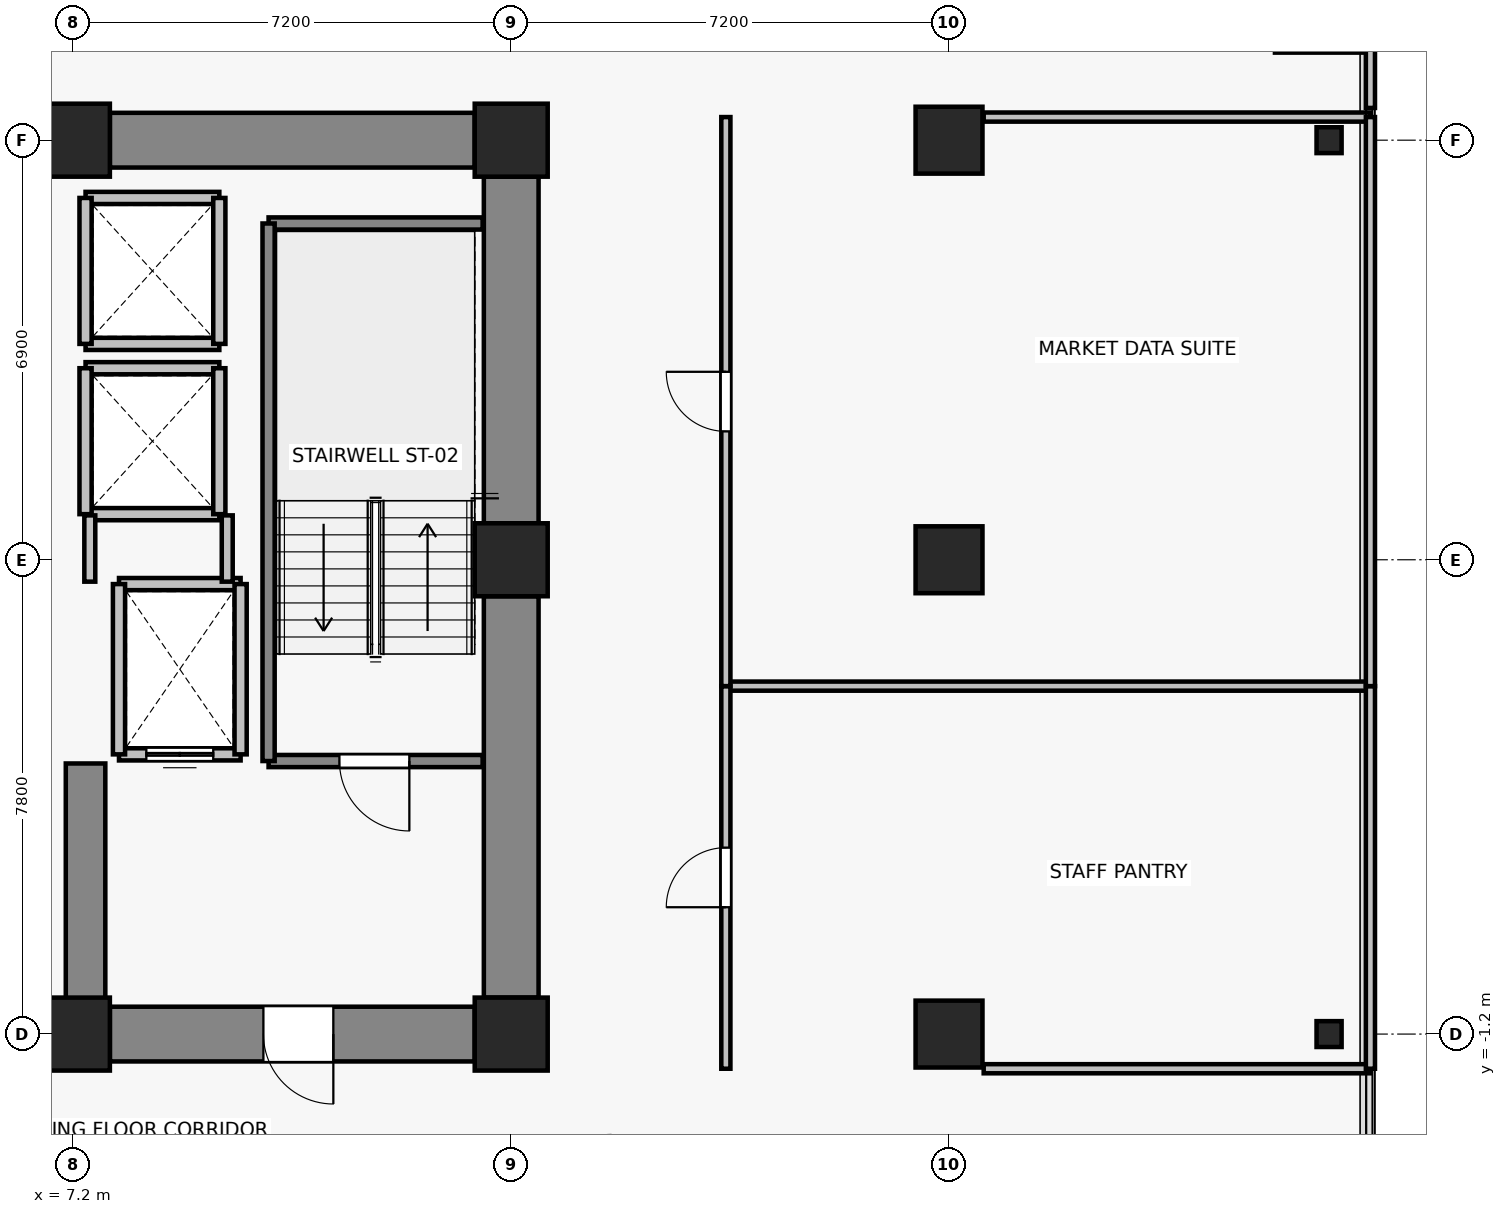
"""IFC4 building model, lengths in metres.
Left out: names, types, materials, properties, quantities, classifications, styles, units other than length and angle.
Written with IfcOpenShell. Run it as: python <this file> out.ifc"""

import sys

from ifc_helpers import new_model, si_unit, direction, frame, frame_2d, origin, origin_2d, place, context, subcontext, project, spatial, rectangle, i_section, extrude, source, transform, mapped, element, fill, save


model = new_model("IFC4")
c1 = context("Model", 3, precision=1e-05, world=origin(), true_north=direction((0.0, 1.0)))
c2 = subcontext(c1, "Body", "Model", "MODEL_VIEW")
j1 = project(units=[si_unit("LENGTHUNIT", "METRE"), si_unit("PLANEANGLEUNIT", "RADIAN")], contexts=[c1])
p1 = place(None, origin())
s1 = spatial("IfcSite", under=j1, at=p1, CompositionType="ELEMENT")
p2 = place(p1, origin())
s2 = spatial("IfcBuilding", under=s1, at=p2, CompositionType="ELEMENT")
p3 = place(p2, frame((0.0, 0.0, 27.4)))
s3 = spatial("IfcBuildingStorey", under=s2, at=p3, CompositionType="ELEMENT", Elevation=27.4)
for number, where, z_axis, x_axis in (
    (1, (7.2, -1.2, 0.0), (0.0, 0.0, 1.0), (1.0, 0.0, 0.0)),
    (2, (14.4, -1.2, 0.0), (0.0, 0.0, 1.0), (1.0, 0.0, 0.0)),
    (3, (14.4, 6.6, 0.0), (0.0, 0.0, 1.0), (1.0, 0.0, 0.0)),
    (4, (7.2, 13.5, 0.0), (0.0, 0.0, 1.0), (1.0, 0.0, 0.0)),
    (5, (14.4, 13.5, 0.0), (0.0, 0.0, 1.0), (1.0, 0.0, 0.0)),
):
    element("IfcColumn", number, at=place(p3, frame(where, z_axis=z_axis, x_axis=x_axis)), inside=s3, PredefinedType="COLUMN", context=c2, shape_type="SweptSolid", body=[
        extrude(rectangle(XDim=1.2, YDim=1.2, at=origin_2d()), origin(), (0.0, 0.0, 1.0), 3.3),
    ])
for number, where, z_axis, x_axis in (
    (6, (21.6, -1.2, 0.0), (0.0, 0.0, 1.0), (1.0, 0.0, 0.0)),
    (7, (21.6, 6.6, 0.0), (0.0, 0.0, 1.0), (1.0, 0.0, 0.0)),
    (8, (21.6, 13.5, 0.0), (0.0, 0.0, 1.0), (1.0, 0.0, 0.0)),
):
    element("IfcColumn", number, at=place(p3, frame(where, z_axis=z_axis, x_axis=x_axis)), inside=s3, PredefinedType="COLUMN", context=c2, shape_type="SweptSolid", body=[
        extrude(rectangle(XDim=1.1, YDim=1.1, at=origin_2d()), origin(), (0.0, 0.0, 1.0), 3.3),
    ])
for number, where, z_axis, x_axis in (
    (9, (27.85, -1.2, 0.0), (0.0, 0.0, 1.0), (1.0, 0.0, 0.0)),
    (10, (27.85, 13.5, 0.0), (0.0, 0.0, 1.0), (1.0, 0.0, 0.0)),
):
    element("IfcColumn", number, at=place(p3, frame(where, z_axis=z_axis, x_axis=x_axis)), inside=s3, PredefinedType="COLUMN", context=c2, shape_type="SweptSolid", body=[
        extrude(i_section(OverallWidth=0.412, OverallDepth=0.425, WebThickness=0.026, FlangeThickness=0.039, FilletRadius=0.015, at=origin_2d()), origin(), (0.0, 0.0, 1.0), 3.3),
    ])
p4 = place(p3, frame((7.8, 13.5, 0.0), z_axis=(0.0, 0.0, 1.0), x_axis=(1.0, 0.0, 0.0)))
e11 = element("IfcWall", 11, at=p4, inside=s3, PredefinedType="SHEAR", context=c2, shape_type="SweptSolid", body=[
    extrude(rectangle(XDim=6.0, YDim=0.9, at=frame_2d((3.0, 0.0))), origin(), (0.0, 0.0, 1.0), 3.075),
])
p5 = place(p3, frame((14.4, -0.6, 0.0), z_axis=(0.0, 0.0, 1.0), x_axis=(0.0, 1.0, 0.0)))
e12 = element("IfcWall", 12, at=p5, inside=s3, PredefinedType="SHEAR", context=c2, shape_type="SweptSolid", body=[
    extrude(rectangle(XDim=6.6, YDim=0.9, at=frame_2d((3.3, 0.0))), origin(), (0.0, 0.0, 1.0), 3.075),
])
p6 = place(p3, frame((14.4, 7.2, 0.0), z_axis=(0.0, 0.0, 1.0), x_axis=(0.0, 1.0, 0.0)))
e13 = element("IfcWall", 13, at=p6, inside=s3, PredefinedType="SHEAR", context=c2, shape_type="SweptSolid", body=[
    extrude(rectangle(XDim=5.7, YDim=0.9, at=frame_2d((2.85, 0.0))), origin(), (0.0, 0.0, 1.0), 3.075),
])
p7 = place(p3, frame((13.8, -1.2, 0.0), z_axis=(0.0, 0.0, 1.0), x_axis=(-1.0, 0.0, 0.0)))
e14 = element("IfcWall", 14, at=p7, inside=s3, PredefinedType="SHEAR", context=c2, shape_type="SweptSolid", body=[
    extrude(rectangle(XDim=6.0, YDim=0.9, at=frame_2d((3.0, 0.0))), origin(), (0.0, 0.0, 1.0), 3.075),
])
p8 = place(p7, frame((2.325, 0.0, 0.0)))
e15 = element("IfcOpeningElement", 15, at=p8, cuts=e14, PredefinedType="OPENING", context=c2, shape_type="SweptSolid", body=[
    extrude(rectangle(XDim=1.15, YDim=2.15, at=frame_2d((0.575, 1.075))), frame((0.0, 0.46, 0.0), z_axis=(0.0, -1.0, 0.0), x_axis=(1.0, 0.0, 0.0)), (0.0, 0.0, 1.0), 0.92),
])
p9 = place(p3, frame((7.4, -0.75, 0.0), z_axis=(0.0, 0.0, 1.0), x_axis=(0.0, 1.0, 0.0)))
e16 = element("IfcWall", 16, at=p9, inside=s3, PredefinedType="SHEAR", context=c2, shape_type="SweptSolid", body=[
    extrude(rectangle(XDim=4.0, YDim=0.65, at=frame_2d((2.0, 0.0))), origin(), (0.0, 0.0, 1.0), 3.075),
])
p10 = place(p3, frame((28.46, 15.06, 0.0), z_axis=(0.0, 0.0, 1.0), x_axis=(-1.0, 0.0, 0.0)))
e17 = element("IfcWall", 17, at=p10, inside=s3, PredefinedType="SOLIDWALL", context=c2, shape_type="SweptSolid", body=[
    extrude(rectangle(XDim=1.5, YDim=0.24, at=frame_2d((0.75, 0.0))), origin(), (0.0, 0.0, 1.0), 3.075),
])
p11 = place(p3, frame((9.95, 3.4, 0.0), z_axis=(0.0, 0.0, 1.0), x_axis=(-1.0, 0.0, 0.0)))
e18 = element("IfcWall", 18, at=p11, inside=s3, PredefinedType="SOLIDWALL", context=c2, shape_type="SweptSolid", body=[
    extrude(rectangle(XDim=2.0, YDim=0.2, at=frame_2d((1.0, 0.0))), origin(), (0.0, 0.0, 1.0), 3.075),
])
p12 = place(p11, frame((0.45, 0.0, 0.0)))
e19 = element("IfcOpeningElement", 19, at=p12, cuts=e18, PredefinedType="OPENING", context=c2, shape_type="SweptSolid", body=[
    extrude(rectangle(XDim=1.1, YDim=2.2, at=frame_2d((0.55, 1.1))), frame((0.0, 0.11, 0.0), z_axis=(0.0, -1.0, 0.0), x_axis=(1.0, 0.0, 0.0)), (0.0, 0.0, 1.0), 0.22),
])
p13 = place(p3, frame((7.95, 6.2, 0.0), z_axis=(0.0, 0.0, 1.0), x_axis=(1.0, 0.0, 0.0)))
e20 = element("IfcWall", 20, at=p13, inside=s3, PredefinedType="SOLIDWALL", context=c2, shape_type="SweptSolid", body=[
    extrude(rectangle(XDim=2.0, YDim=0.2, at=frame_2d((1.0, 0.0))), origin(), (0.0, 0.0, 1.0), 3.075),
])
for number, where, z_axis, x_axis in (
    (21, (7.95, 3.4, 0.0), (0.0, 0.0, 1.0), (0.0, 1.0, 0.0)),
    (22, (9.95, 6.2, 0.0), (0.0, 0.0, 1.0), (0.0, -1.0, 0.0)),
):
    element("IfcWall", number, at=place(p3, frame(where, z_axis=z_axis, x_axis=x_axis)), inside=s3, PredefinedType="SOLIDWALL", context=c2, shape_type="SweptSolid", body=[
        extrude(rectangle(XDim=2.8, YDim=0.2, at=frame_2d((1.4, 0.0))), origin(), (0.0, 0.0, 1.0), 3.075),
    ])
for number, where, z_axis, x_axis in (
    (23, (9.6, 7.35, 0.0), (0.0, 0.0, 1.0), (-1.0, 0.0, 0.0)),
    (24, (7.4, 9.75, 0.0), (0.0, 0.0, 1.0), (1.0, 0.0, 0.0)),
):
    element("IfcWall", number, at=place(p3, frame(where, z_axis=z_axis, x_axis=x_axis)), inside=s3, PredefinedType="SOLIDWALL", context=c2, shape_type="SweptSolid", body=[
        extrude(rectangle(XDim=2.2, YDim=0.2, at=frame_2d((1.1, 0.0))), origin(), (0.0, 0.0, 1.0), 2.465),
    ])
p14 = place(p3, frame((7.4, 7.35, 0.0), z_axis=(0.0, 0.0, 1.0), x_axis=(0.0, 1.0, 0.0)))
e25 = element("IfcWall", 25, at=p14, inside=s3, PredefinedType="SOLIDWALL", context=c2, shape_type="SweptSolid", body=[
    extrude(rectangle(XDim=2.4, YDim=0.2, at=frame_2d((1.2, 0.0))), origin(), (0.0, 0.0, 1.0), 2.465),
])
p15 = place(p3, frame((9.6, 9.75, 0.0), z_axis=(0.0, 0.0, 1.0), x_axis=(0.0, -1.0, 0.0)))
e26 = element("IfcWall", 26, at=p15, inside=s3, PredefinedType="SOLIDWALL", context=c2, shape_type="SweptSolid", body=[
    extrude(rectangle(XDim=2.4, YDim=0.2, at=frame_2d((1.2, 0.0))), origin(), (0.0, 0.0, 1.0), 3.075),
])
for number, where, z_axis, x_axis in (
    (27, (9.6, 10.15, 0.0), (0.0, 0.0, 1.0), (-1.0, 0.0, 0.0)),
    (28, (7.4, 12.55, 0.0), (0.0, 0.0, 1.0), (1.0, 0.0, 0.0)),
):
    element("IfcWall", number, at=place(p3, frame(where, z_axis=z_axis, x_axis=x_axis)), inside=s3, PredefinedType="SOLIDWALL", context=c2, shape_type="SweptSolid", body=[
        extrude(rectangle(XDim=2.2, YDim=0.2, at=frame_2d((1.1, 0.0))), origin(), (0.0, 0.0, 1.0), 2.465),
    ])
p16 = place(p3, frame((7.4, 10.15, 0.0), z_axis=(0.0, 0.0, 1.0), x_axis=(0.0, 1.0, 0.0)))
e29 = element("IfcWall", 29, at=p16, inside=s3, PredefinedType="SOLIDWALL", context=c2, shape_type="SweptSolid", body=[
    extrude(rectangle(XDim=2.4, YDim=0.2, at=frame_2d((1.2, 0.0))), origin(), (0.0, 0.0, 1.0), 2.465),
])
p17 = place(p3, frame((9.6, 12.55, 0.0), z_axis=(0.0, 0.0, 1.0), x_axis=(0.0, -1.0, 0.0)))
e30 = element("IfcWall", 30, at=p17, inside=s3, PredefinedType="SOLIDWALL", context=c2, shape_type="SweptSolid", body=[
    extrude(rectangle(XDim=2.4, YDim=0.2, at=frame_2d((1.2, 0.0))), origin(), (0.0, 0.0, 1.0), 3.075),
])
p18 = place(p3, frame((13.93, 3.29, 0.0), z_axis=(0.0, 0.0, 1.0), x_axis=(-1.0, 0.0, 0.0)))
e31 = element("IfcWall", 31, at=p18, inside=s3, PredefinedType="SOLIDWALL", context=c2, shape_type="SweptSolid", body=[
    extrude(rectangle(XDim=3.52, YDim=0.2, at=frame_2d((1.76, 0.0))), origin(), (0.0, 0.0, 1.0), 3.075),
])
p19 = place(p18, frame((1.205, 0.0, 0.0)))
e32 = element("IfcOpeningElement", 32, at=p19, cuts=e31, PredefinedType="OPENING", context=c2, shape_type="SweptSolid", body=[
    extrude(rectangle(XDim=1.15, YDim=2.15, at=frame_2d((0.575, 1.075))), frame((0.0, 0.11, 0.0), z_axis=(0.0, -1.0, 0.0), x_axis=(1.0, 0.0, 0.0)), (0.0, 0.0, 1.0), 0.22),
])
p20 = place(p3, frame((10.41, 12.13, 0.0), z_axis=(0.0, 0.0, 1.0), x_axis=(1.0, 0.0, 0.0)))
e33 = element("IfcWall", 33, at=p20, inside=s3, PredefinedType="SOLIDWALL", context=c2, shape_type="SweptSolid", body=[
    extrude(rectangle(XDim=3.52, YDim=0.2, at=frame_2d((1.76, 0.0))), origin(), (0.0, 0.0, 1.0), 3.075),
])
p21 = place(p3, frame((10.41, 3.29, 0.0), z_axis=(0.0, 0.0, 1.0), x_axis=(0.0, 1.0, 0.0)))
e34 = element("IfcWall", 34, at=p21, inside=s3, PredefinedType="SOLIDWALL", context=c2, shape_type="SweptSolid", body=[
    extrude(rectangle(XDim=8.84, YDim=0.2, at=frame_2d((4.42, 0.0))), origin(), (0.0, 0.0, 1.0), 3.075),
])
p22 = place(p3, frame((7.47, 6.24, 0.0), z_axis=(0.0, 0.0, 1.0), x_axis=(0.0, 1.0, 0.0)))
e35 = element("IfcWall", 35, at=p22, inside=s3, PredefinedType="PARTITIONING", context=c2, shape_type="SweptSolid", body=[
    extrude(rectangle(XDim=1.09, YDim=0.18, at=frame_2d((0.545, 0.0))), origin(), (0.0, 0.0, 1.0), 2.465),
])
p23 = place(p3, frame((9.73, 7.33, 0.0), z_axis=(0.0, 0.0, 1.0), x_axis=(0.0, -1.0, 0.0)))
e36 = element("IfcWall", 36, at=p23, inside=s3, PredefinedType="PARTITIONING", context=c2, shape_type="SweptSolid", body=[
    extrude(rectangle(XDim=1.09, YDim=0.18, at=frame_2d((0.545, 0.0))), origin(), (0.0, 0.0, 1.0), 3.075),
])
p24 = place(p3, frame((28.53, -1.77, 0.0), z_axis=(0.0, 0.0, 1.0), x_axis=(-1.0, 0.0, 0.0)))
e37 = element("IfcWall", 37, at=p24, inside=s3, PredefinedType="PARTITIONING", context=c2, shape_type="SweptSolid", body=[
    extrude(rectangle(XDim=6.36, YDim=0.15, at=frame_2d((3.18, 0.0))), origin(), (0.0, 0.0, 1.0), 2.465),
])
p25 = place(p3, frame((17.93, 4.522, 0.0), z_axis=(0.0, 0.0, 1.0), x_axis=(1.0, 0.0, 0.0)))
e38 = element("IfcWall", 38, at=p25, inside=s3, PredefinedType="PARTITIONING", context=c2, shape_type="SweptSolid", body=[
    extrude(rectangle(XDim=10.6, YDim=0.15, at=frame_2d((5.3, 0.0))), origin(), (0.0, 0.0, 1.0), 2.465),
])
p26 = place(p3, frame((17.93, -1.77, 0.0), z_axis=(0.0, 0.0, 1.0), x_axis=(0.0, 1.0, 0.0)))
e39 = element("IfcWall", 39, at=p26, inside=s3, PredefinedType="PARTITIONING", context=c2, shape_type="SweptSolid", body=[
    extrude(rectangle(XDim=6.292, YDim=0.15, at=frame_2d((3.146, 0.0))), origin(), (0.0, 0.0, 1.0), 2.465),
])
p27 = place(p26, frame((2.656, 0.0, 0.0)))
e40 = element("IfcOpeningElement", 40, at=p27, cuts=e39, PredefinedType="OPENING", context=c2, shape_type="SweptSolid", body=[
    extrude(rectangle(XDim=0.98, YDim=2.15, at=frame_2d((0.49, 1.075))), frame((0.0, 0.085, 0.0), z_axis=(0.0, -1.0, 0.0), x_axis=(1.0, 0.0, 0.0)), (0.0, 0.0, 1.0), 0.17),
])
p28 = place(p3, frame((28.53, 4.522, 0.0), z_axis=(0.0, 0.0, 1.0), x_axis=(0.0, -1.0, 0.0)))
e41 = element("IfcWall", 41, at=p28, inside=s3, PredefinedType="PARTITIONING", context=c2, shape_type="SweptSolid", body=[
    extrude(rectangle(XDim=6.292, YDim=0.15, at=frame_2d((3.146, 0.0))), origin(), (0.0, 0.0, 1.0), 3.075),
])
p29 = place(p3, frame((22.17, 13.88, 0.0), z_axis=(0.0, 0.0, 1.0), x_axis=(1.0, 0.0, 0.0)))
e42 = element("IfcWall", 42, at=p29, inside=s3, PredefinedType="PARTITIONING", context=c2, shape_type="SweptSolid", body=[
    extrude(rectangle(XDim=6.36, YDim=0.15, at=frame_2d((3.18, 0.0))), origin(), (0.0, 0.0, 1.0), 3.075),
])
p30 = place(p3, frame((17.93, 4.522, 0.0), z_axis=(0.0, 0.0, 1.0), x_axis=(0.0, 1.0, 0.0)))
e43 = element("IfcWall", 43, at=p30, inside=s3, PredefinedType="PARTITIONING", context=c2, shape_type="SweptSolid", body=[
    extrude(rectangle(XDim=9.358, YDim=0.15, at=frame_2d((4.679, 0.0))), origin(), (0.0, 0.0, 1.0), 2.465),
])
p31 = place(p30, frame((4.189, 0.0, 0.0)))
e44 = element("IfcOpeningElement", 44, at=p31, cuts=e43, PredefinedType="OPENING", context=c2, shape_type="SweptSolid", body=[
    extrude(rectangle(XDim=0.98, YDim=2.15, at=frame_2d((0.49, 1.075))), frame((0.0, 0.085, 0.0), z_axis=(0.0, -1.0, 0.0), x_axis=(1.0, 0.0, 0.0)), (0.0, 0.0, 1.0), 0.17),
])
p32 = place(p3, frame((28.53, 13.88, 0.0), z_axis=(0.0, 0.0, 1.0), x_axis=(0.0, -1.0, 0.0)))
e45 = element("IfcWall", 45, at=p32, inside=s3, PredefinedType="PARTITIONING", context=c2, shape_type="SweptSolid", body=[
    extrude(rectangle(XDim=9.358, YDim=0.15, at=frame_2d((4.679, 0.0))), origin(), (0.0, 0.0, 1.0), 3.075),
])
p33 = place(p3, frame((28.53, 18.13, 0.0), z_axis=(0.0, 0.0, 1.0), x_axis=(0.0, -1.0, 0.0)))
e46 = element("IfcWall", 46, at=p33, inside=s3, PredefinedType="PARTITIONING", context=c2, shape_type="SweptSolid", body=[
    extrude(rectangle(XDim=4.1, YDim=0.15, at=frame_2d((2.05, 0.0))), origin(), (0.0, 0.0, 1.0), 3.075),
])
m1 = source(origin(), c2, "Body", "SweptSolid", [
    extrude(rectangle(XDim=1.1, YDim=2.2, at=frame_2d((0.55, 1.1))), frame((0.0, 0.025, 0.0), z_axis=(0.0, -1.0, 0.0), x_axis=(1.0, 0.0, 0.0)), (0.0, 0.0, 1.0), 0.05),
])
p34 = place(p12, origin())
e47 = element("IfcDoor", 47, at=p34, inside=s3, OperationType="DOUBLE_DOOR_SLIDING", PredefinedType="DOOR", context=c2, shape_type="MappedRepresentation", body=[
    mapped(m1, transform((0.0, 0.0, 0.0), x_axis=(1.0, 0.0, 0.0), y_axis=(0.0, 1.0, 0.0), z_axis=(0.0, 0.0, 1.0), scale=1.0)),
])
fill(e19, e47)
m2 = source(origin(), c2, "Body", "SweptSolid", [
    extrude(rectangle(XDim=1.15, YDim=2.15, at=frame_2d((0.575, 1.075))), frame((0.0, 0.025, 0.0), z_axis=(0.0, -1.0, 0.0), x_axis=(1.0, 0.0, 0.0)), (0.0, 0.0, 1.0), 0.05),
])
p35 = place(p19, origin())
e48 = element("IfcDoor", 48, at=p35, inside=s3, OperationType="SINGLE_SWING_LEFT", PredefinedType="DOOR", context=c2, shape_type="MappedRepresentation", body=[
    mapped(m2, transform((0.0, 0.0, 0.0), x_axis=(1.0, 0.0, 0.0), y_axis=(0.0, 1.0, 0.0), z_axis=(0.0, 0.0, 1.0), scale=1.0)),
])
fill(e32, e48)
p36 = place(p8, origin())
e49 = element("IfcDoor", 49, at=p36, inside=s3, OperationType="SINGLE_SWING_LEFT", PredefinedType="DOOR", context=c2, shape_type="MappedRepresentation", body=[
    mapped(m2, transform((0.0, 0.0, 0.0), x_axis=(1.0, 0.0, 0.0), y_axis=(0.0, 1.0, 0.0), z_axis=(0.0, 0.0, 1.0), scale=1.0)),
])
fill(e15, e49)
m3 = source(origin(), c2, "Body", "SweptSolid", [
    extrude(rectangle(XDim=0.98, YDim=2.15, at=frame_2d((0.49, 1.075))), frame((0.0, 0.025, 0.0), z_axis=(0.0, -1.0, 0.0), x_axis=(1.0, 0.0, 0.0)), (0.0, 0.0, 1.0), 0.05),
])
p37 = place(p27, origin())
e50 = element("IfcDoor", 50, at=p37, inside=s3, OperationType="SINGLE_SWING_LEFT", PredefinedType="DOOR", context=c2, shape_type="MappedRepresentation", body=[
    mapped(m3, transform((0.0, 0.0, 0.0), x_axis=(1.0, 0.0, 0.0), y_axis=(0.0, 1.0, 0.0), z_axis=(0.0, 0.0, 1.0), scale=1.0)),
])
fill(e40, e50)
p38 = place(p31, origin())
e51 = element("IfcDoor", 51, at=p38, inside=s3, OperationType="SINGLE_SWING_RIGHT", PredefinedType="DOOR", context=c2, shape_type="MappedRepresentation", body=[
    mapped(m3, transform((0.0, 0.0, 0.0), x_axis=(1.0, 0.0, 0.0), y_axis=(0.0, 1.0, 0.0), z_axis=(0.0, 0.0, 1.0), scale=1.0)),
])
fill(e44, e51)
save(model, sys.argv[1])
